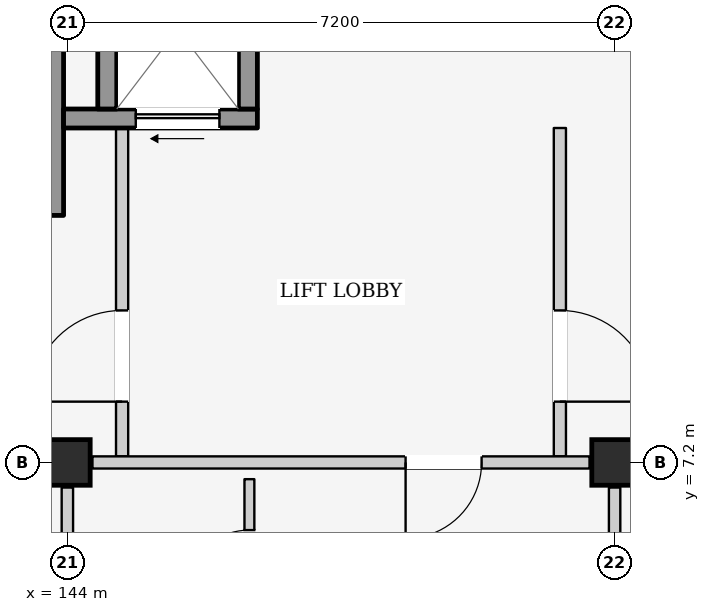
"""IFC4 building model, lengths in metres.
Left out: names, types, materials, properties, quantities, classifications, styles, units other than length and angle.
Written with IfcOpenShell. Run it as: python <this file> out.ifc"""

import sys

from ifc_helpers import new_model, si_unit, direction, frame, frame_2d, origin, origin_2d, place, context, subcontext, project, spatial, rectangle, extrude, element, fill, save


model = new_model("IFC4")
c1 = context("Model", 3, precision=1e-05, world=origin(), true_north=direction((0.0, 1.0)))
c2 = subcontext(c1, "Body", "Model", "MODEL_VIEW")
j1 = project(units=[si_unit("LENGTHUNIT", "METRE"), si_unit("PLANEANGLEUNIT", "RADIAN")], contexts=[c1])
p1 = place(None, origin())
s1 = spatial("IfcSite", under=j1, at=p1, CompositionType="ELEMENT")
p2 = place(p1, origin())
s2 = spatial("IfcBuilding", under=s1, at=p2, CompositionType="ELEMENT")
p3 = place(p2, frame((0.0, 0.0, 15.4)))
s3 = spatial("IfcBuildingStorey", under=s2, at=p3, CompositionType="ELEMENT", Elevation=15.4)
for number, where, z_axis, x_axis in (
    (1, (144.0, 7.2, 0.0), (0.0, 0.0, 1.0), (1.0, 0.0, 0.0)),
    (2, (151.2, 7.2, 0.0), (0.0, 0.0, 1.0), (1.0, 0.0, 0.0)),
):
    element("IfcColumn", number, at=place(p3, frame(where, z_axis=z_axis, x_axis=x_axis)), inside=s3, PredefinedType="COLUMN", context=c2, shape_type="SweptSolid", body=[
        extrude(rectangle(XDim=0.6, YDim=0.6, at=origin_2d()), origin(), (0.0, 0.0, 1.0), 3.2),
    ])
p4 = place(p3, frame((143.8, 10.45, 0.0), z_axis=(0.0, 0.0, 1.0), x_axis=(0.0, 1.0, 0.0)))
e3 = element("IfcWall", 3, at=p4, inside=s3, PredefinedType="SHEAR", context=c2, shape_type="SweptSolid", body=[
    extrude(rectangle(XDim=3.75, YDim=0.3, at=frame_2d((1.875, 0.0))), origin(), (0.0, 0.0, 1.0), 2.95),
])
p5 = place(p3, frame((144.72, 7.28, 0.0), z_axis=(0.0, 0.0, 1.0), x_axis=(0.0, 1.0, 0.0)))
e4 = element("IfcWall", 4, at=p5, inside=s3, PredefinedType="PARTITIONING", context=c2, shape_type="SweptSolid", body=[
    extrude(rectangle(XDim=4.32, YDim=0.16, at=frame_2d((2.16, 0.0))), origin(), (0.0, 0.0, 1.0), 2.95),
])
p6 = place(p5, frame((0.72, 0.0, 0.0)))
e5 = element("IfcOpeningElement", 5, at=p6, cuts=e4, PredefinedType="OPENING", context=c2, shape_type="SweptSolid", body=[
    extrude(rectangle(XDim=1.2, YDim=2.2, at=frame_2d((0.6, 1.1))), frame((0.0, 0.095, 0.0), z_axis=(0.0, -1.0, 0.0), x_axis=(1.0, 0.0, 0.0)), (0.0, 0.0, 1.0), 0.19),
])
p7 = place(p3, frame((150.48, 7.28, 0.0), z_axis=(0.0, 0.0, 1.0), x_axis=(0.0, 1.0, 0.0)))
e6 = element("IfcWall", 6, at=p7, inside=s3, PredefinedType="PARTITIONING", context=c2, shape_type="SweptSolid", body=[
    extrude(rectangle(XDim=4.32, YDim=0.16, at=frame_2d((2.16, 0.0))), origin(), (0.0, 0.0, 1.0), 2.95),
])
p8 = place(p7, frame((0.72, 0.0, 0.0)))
e7 = element("IfcOpeningElement", 7, at=p8, cuts=e6, PredefinedType="OPENING", context=c2, shape_type="SweptSolid", body=[
    extrude(rectangle(XDim=1.2, YDim=2.2, at=frame_2d((0.6, 1.1))), frame((0.0, 0.095, 0.0), z_axis=(0.0, -1.0, 0.0), x_axis=(1.0, 0.0, 0.0)), (0.0, 0.0, 1.0), 0.19),
])
p9 = place(p3, frame((143.95, 11.725, 0.0), z_axis=(0.0, 0.0, 1.0), x_axis=(1.0, 0.0, 0.0)))
e8 = element("IfcWall", 8, at=p9, inside=s3, PredefinedType="SHEAR", context=c2, shape_type="SweptSolid", body=[
    extrude(rectangle(XDim=2.55, YDim=0.25, at=frame_2d((1.275, 0.0))), origin(), (0.0, 0.0, 1.0), 2.95),
])
p10 = place(p9, frame((0.95, 0.0, 0.0)))
e9 = element("IfcOpeningElement", 9, at=p10, cuts=e8, PredefinedType="OPENING", context=c2, shape_type="SweptSolid", body=[
    extrude(rectangle(XDim=1.1, YDim=2.15, at=frame_2d((0.55, 1.075))), frame((0.0, 0.14, 0.0), z_axis=(0.0, -1.0, 0.0), x_axis=(1.0, 0.0, 0.0)), (0.0, 0.0, 1.0), 0.28),
])
for number, where, z_axis, x_axis in (
    (10, (144.525, 11.85, 0.0), (0.0, 0.0, 1.0), (0.0, 1.0, 0.0)),
    (11, (146.375, 11.85, 0.0), (0.0, 0.0, 1.0), (0.0, 1.0, 0.0)),
):
    element("IfcWall", number, at=place(p3, frame(where, z_axis=z_axis, x_axis=x_axis)), inside=s3, PredefinedType="SHEAR", context=c2, shape_type="SweptSolid", body=[
        extrude(rectangle(XDim=2.1, YDim=0.25, at=frame_2d((1.05, 0.0))), origin(), (0.0, 0.0, 1.0), 2.95),
    ])
p11 = place(p3, frame((144.0, 0.33, 0.0), z_axis=(0.0, 0.0, 1.0), x_axis=(0.0, 1.0, 0.0)))
e12 = element("IfcWall", 12, at=p11, inside=s3, PredefinedType="PARTITIONING", context=c2, shape_type="SweptSolid", body=[
    extrude(rectangle(XDim=6.54, YDim=0.15, at=frame_2d((3.27, 0.0))), origin(), (0.0, 0.0, 1.0), 2.385),
])
p12 = place(p3, frame((144.33, 7.2, 0.0), z_axis=(0.0, 0.0, 1.0), x_axis=(1.0, 0.0, 0.0)))
e13 = element("IfcWall", 13, at=p12, inside=s3, PredefinedType="PARTITIONING", context=c2, shape_type="SweptSolid", body=[
    extrude(rectangle(XDim=6.54, YDim=0.16, at=frame_2d((3.27, 0.0))), origin(), (0.0, 0.0, 1.0), 2.335),
])
p13 = place(p12, frame((4.12, 0.0, 0.0)))
e14 = element("IfcOpeningElement", 14, at=p13, cuts=e13, PredefinedType="OPENING", context=c2, shape_type="SweptSolid", body=[
    extrude(rectangle(XDim=1.0, YDim=2.15, at=frame_2d((0.5, 1.075))), frame((0.0, 0.095, 0.0), z_axis=(0.0, -1.0, 0.0), x_axis=(1.0, 0.0, 0.0)), (0.0, 0.0, 1.0), 0.19),
])
p14 = place(p3, frame((151.2, 0.33, 0.0), z_axis=(0.0, 0.0, 1.0), x_axis=(0.0, 1.0, 0.0)))
e15 = element("IfcWall", 15, at=p14, inside=s3, PredefinedType="PARTITIONING", context=c2, shape_type="SweptSolid", body=[
    extrude(rectangle(XDim=6.54, YDim=0.15, at=frame_2d((3.27, 0.0))), origin(), (0.0, 0.0, 1.0), 2.385),
])
p15 = place(p3, frame((146.395, 4.76, 0.0), z_axis=(0.0, 0.0, 1.0), x_axis=(0.0, 1.0, 0.0)))
e16 = element("IfcWall", 16, at=p15, inside=s3, PredefinedType="PARTITIONING", context=c2, shape_type="SweptSolid", body=[
    extrude(rectangle(XDim=2.22, YDim=0.13, at=frame_2d((1.11, 0.0))), origin(), (0.0, 0.0, 1.0), 2.95),
])
p16 = place(p15, frame((0.67, 0.0, 0.0)))
e17 = element("IfcOpeningElement", 17, at=p16, cuts=e16, PredefinedType="OPENING", context=c2, shape_type="SweptSolid", body=[
    extrude(rectangle(XDim=0.88, YDim=2.1, at=frame_2d((0.44, 1.05))), frame((0.0, 0.08, 0.0), z_axis=(0.0, -1.0, 0.0), x_axis=(1.0, 0.0, 0.0)), (0.0, 0.0, 1.0), 0.16),
])
p17 = place(p6, origin())
e18 = element("IfcDoor", 18, at=p17, inside=s3, OperationType="SINGLE_SWING_LEFT", PredefinedType="DOOR", context=c2, shape_type="SweptSolid", body=[
    extrude(rectangle(XDim=1.2, YDim=2.2, at=frame_2d((0.6, 1.1))), frame((0.0, 0.025, 0.0), z_axis=(0.0, -1.0, 0.0), x_axis=(1.0, 0.0, 0.0)), (0.0, 0.0, 1.0), 0.05),
])
fill(e5, e18)
p18 = place(p8, frame((1.2, 0.0, 0.0), z_axis=(0.0, 0.0, 1.0), x_axis=(-1.0, 0.0, 0.0)))
e19 = element("IfcDoor", 19, at=p18, inside=s3, OperationType="SINGLE_SWING_RIGHT", PredefinedType="DOOR", context=c2, shape_type="SweptSolid", body=[
    extrude(rectangle(XDim=1.2, YDim=2.2, at=frame_2d((0.6, 1.1))), frame((0.0, 0.025, 0.0), z_axis=(0.0, -1.0, 0.0), x_axis=(1.0, 0.0, 0.0)), (0.0, 0.0, 1.0), 0.05),
])
fill(e7, e19)
p19 = place(p10, frame((1.1, 0.0, 0.0), z_axis=(0.0, 0.0, 1.0), x_axis=(-1.0, 0.0, 0.0)))
e20 = element("IfcDoor", 20, at=p19, inside=s3, OperationType="SLIDING_TO_LEFT", PredefinedType="DOOR", context=c2, shape_type="SweptSolid", body=[
    extrude(rectangle(XDim=1.1, YDim=2.15, at=frame_2d((0.55, 1.075))), frame((0.0, 0.025, 0.0), z_axis=(0.0, -1.0, 0.0), x_axis=(1.0, 0.0, 0.0)), (0.0, 0.0, 1.0), 0.05),
])
fill(e9, e20)
p20 = place(p13, frame((1.0, 0.0, 0.0), z_axis=(0.0, 0.0, 1.0), x_axis=(-1.0, 0.0, 0.0)))
e21 = element("IfcDoor", 21, at=p20, inside=s3, OperationType="SINGLE_SWING_RIGHT", PredefinedType="DOOR", context=c2, shape_type="SweptSolid", body=[
    extrude(rectangle(XDim=1.0, YDim=2.15, at=frame_2d((0.5, 1.075))), frame((0.0, 0.025, 0.0), z_axis=(0.0, -1.0, 0.0), x_axis=(1.0, 0.0, 0.0)), (0.0, 0.0, 1.0), 0.05),
])
fill(e14, e21)
p21 = place(p16, origin())
e22 = element("IfcDoor", 22, at=p21, inside=s3, OperationType="SINGLE_SWING_LEFT", PredefinedType="DOOR", context=c2, shape_type="SweptSolid", body=[
    extrude(rectangle(XDim=0.88, YDim=2.1, at=frame_2d((0.44, 1.05))), frame((0.0, 0.025, 0.0), z_axis=(0.0, -1.0, 0.0), x_axis=(1.0, 0.0, 0.0)), (0.0, 0.0, 1.0), 0.05),
])
fill(e17, e22)
save(model, sys.argv[1])
